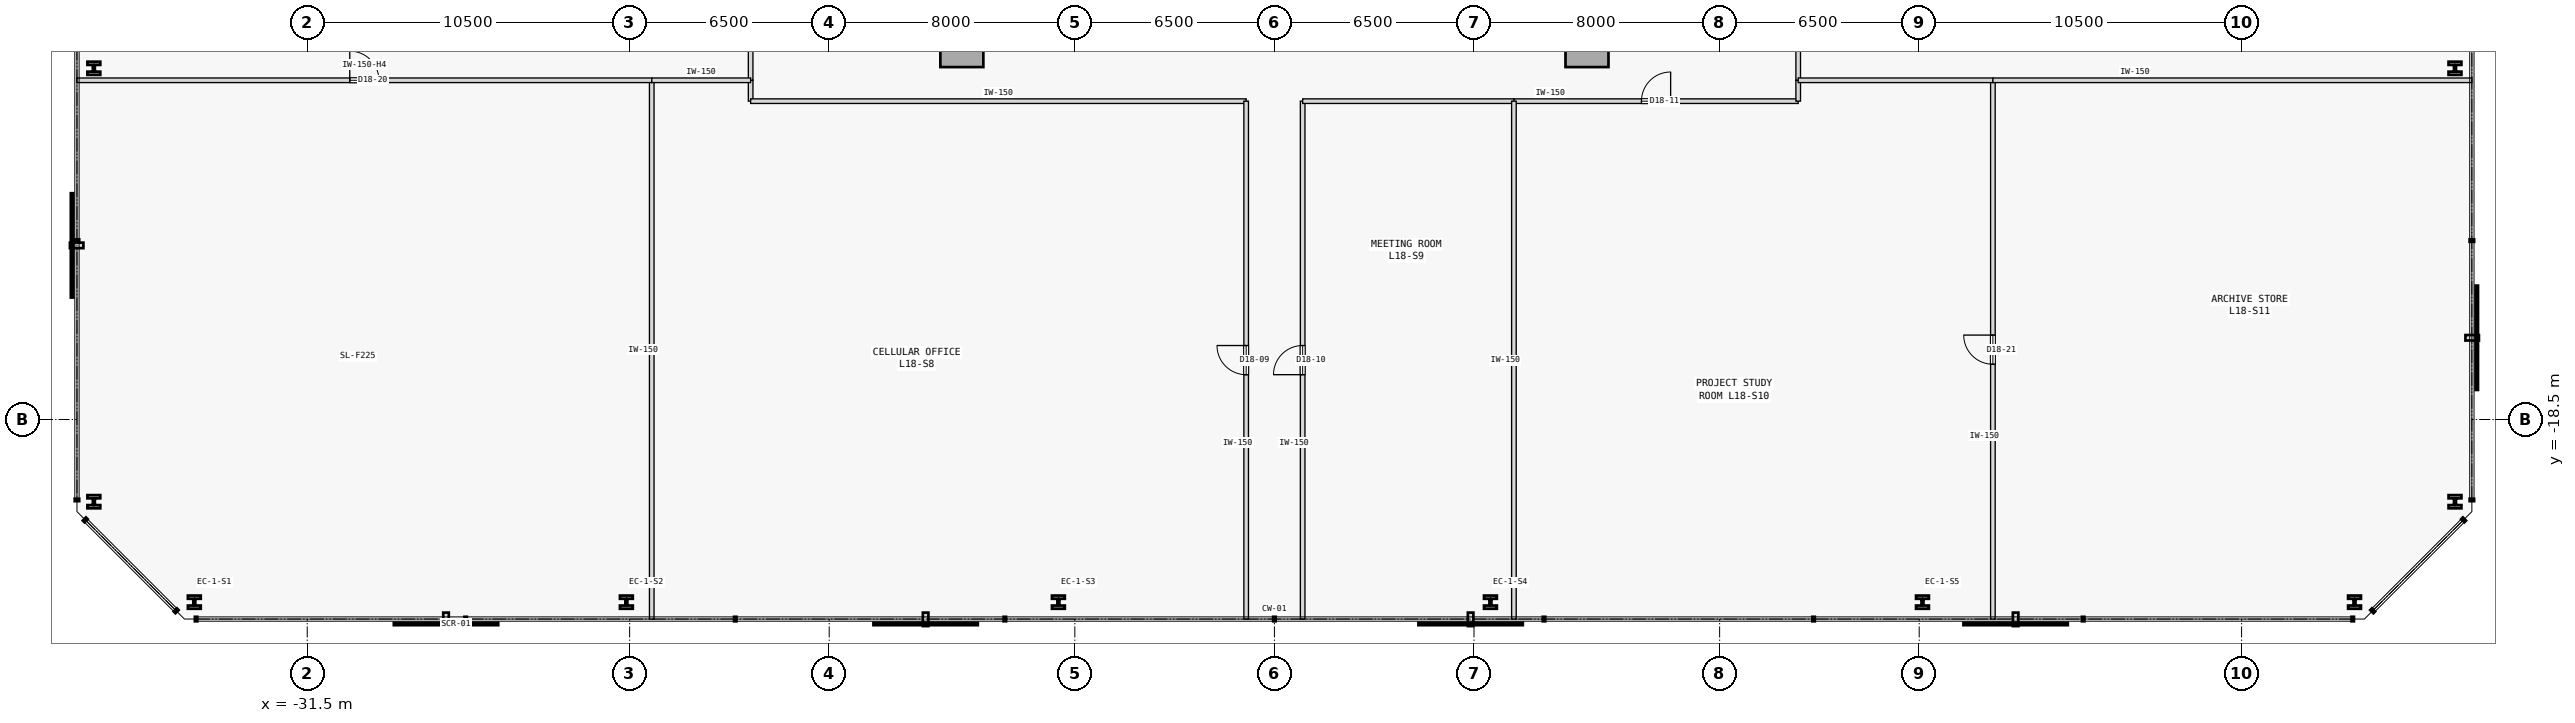
"""IFC4 building model, lengths in metres.
Left out: names, types, materials, properties, quantities, classifications, styles, units other than length and angle.
Written with IfcOpenShell. Run it as: python <this file> out.ifc"""

import sys

from ifc_helpers import new_model, si_unit, direction, frame, frame_2d, origin, origin_2d, place, context, subcontext, project, spatial, rectangle, i_section, extrude, element, fill, save


model = new_model("IFC4")
c1 = context("Model", 3, precision=1e-05, world=origin(), true_north=direction((0.0, 1.0)))
c2 = subcontext(c1, "Body", "Model", "MODEL_VIEW")
j1 = project(units=[si_unit("LENGTHUNIT", "METRE"), si_unit("PLANEANGLEUNIT", "RADIAN")], contexts=[c1])
p1 = place(None, origin())
s1 = spatial("IfcSite", under=j1, at=p1, CompositionType="ELEMENT")
p2 = place(p1, origin())
s2 = spatial("IfcBuilding", under=s1, at=p2, CompositionType="ELEMENT")
p3 = place(p2, frame((0.0, 0.0, 75.0)))
s3 = spatial("IfcBuildingStorey", under=s2, at=p3, CompositionType="ELEMENT", Elevation=75.0)
for number, where, z_axis, x_axis in (
    (1, (-10.18, -6.32, 0.0), (0.0, 0.0, 1.0), (1.0, 0.0, 0.0)),
    (2, (10.18, -6.32, 0.0), (0.0, 0.0, 1.0), (1.0, 0.0, 0.0)),
):
    element("IfcColumn", number, at=place(p3, frame(where, z_axis=z_axis, x_axis=x_axis)), inside=s3, PredefinedType="COLUMN", context=c2, shape_type="SweptSolid", body=[
        extrude(rectangle(XDim=1.4, YDim=1.4, at=origin_2d()), origin(), (0.0, 0.0, 1.0), 3.8),
    ])
for number, where, z_axis, x_axis in (
    (3, (-35.178, -24.45, 0.0), (0.0, 0.0, 1.0), (1.0, 0.0, 0.0)),
    (4, (-21.107, -24.45, 0.0), (0.0, 0.0, 1.0), (1.0, 0.0, 0.0)),
    (5, (-7.036, -24.45, 0.0), (0.0, 0.0, 1.0), (1.0, 0.0, 0.0)),
    (6, (7.036, -24.45, 0.0), (0.0, 0.0, 1.0), (1.0, 0.0, 0.0)),
    (7, (21.107, -24.45, 0.0), (0.0, 0.0, 1.0), (1.0, 0.0, 0.0)),
    (8, (35.178, -24.45, 0.0), (0.0, 0.0, 1.0), (1.0, 0.0, 0.0)),
    (9, (38.45, -21.178, 0.0), (0.0, 0.0, 1.0), (1.0, 0.0, 0.0)),
    (10, (38.45, -7.059, 0.0), (0.0, 0.0, 1.0), (1.0, 0.0, 0.0)),
    (11, (-38.45, -7.059, 0.0), (0.0, 0.0, 1.0), (1.0, 0.0, 0.0)),
    (12, (-38.45, -21.178, 0.0), (0.0, 0.0, 1.0), (1.0, 0.0, 0.0)),
):
    element("IfcColumn", number, at=place(p3, frame(where, z_axis=z_axis, x_axis=x_axis)), inside=s3, PredefinedType="COLUMN", context=c2, shape_type="SweptSolid", body=[
        extrude(i_section(OverallWidth=0.42, OverallDepth=0.431, WebThickness=0.065, FlangeThickness=0.106, FilletRadius=0.015, at=origin_2d()), origin(), (0.0, 0.0, 1.0), 3.8),
    ])
p4 = place(p3, frame((-17.059, -8.13, 0.0), z_axis=(0.0, 0.0, 1.0), x_axis=(0.0, 1.0, 0.0)))
e13 = element("IfcWall", 13, at=p4, inside=s3, PredefinedType="PARTITIONING", context=c2, shape_type="SweptSolid", body=[
    extrude(rectangle(XDim=0.68, YDim=0.15, at=frame_2d((0.34, 0.0))), origin(), (0.0, 0.0, 1.0), 3.4),
])
p5 = place(p3, frame((-17.059, -8.13, 0.0), z_axis=(0.0, 0.0, 1.0), x_axis=(1.0, 0.0, 0.0)))
e14 = element("IfcWall", 14, at=p5, inside=s3, PredefinedType="PARTITIONING", context=c2, shape_type="SweptSolid", body=[
    extrude(rectangle(XDim=16.139, YDim=0.15, at=frame_2d((8.07, 0.0))), origin(), (0.0, 0.0, 1.0), 3.4),
])
p6 = place(p3, frame((-0.92, -25.0, 0.0), z_axis=(0.0, 0.0, 1.0), x_axis=(0.0, 1.0, 0.0)))
e15 = element("IfcWall", 15, at=p6, inside=s3, PredefinedType="PARTITIONING", context=c2, shape_type="SweptSolid", body=[
    extrude(rectangle(XDim=16.87, YDim=0.15, at=frame_2d((8.435, 0.0))), origin(), (0.0, 0.0, 1.0), 3.4),
])
p7 = place(p6, frame((7.96, 0.0, 0.0)))
e16 = element("IfcOpeningElement", 16, at=p7, cuts=e15, PredefinedType="OPENING", context=c2, shape_type="SweptSolid", body=[
    extrude(rectangle(XDim=0.95, YDim=2.15, at=frame_2d((0.475, 1.075))), frame((0.0, 0.085, 0.0), z_axis=(0.0, -1.0, 0.0), x_axis=(1.0, 0.0, 0.0)), (0.0, 0.0, 1.0), 0.17),
])
p8 = place(p3, frame((0.92, -25.0, 0.0), z_axis=(0.0, 0.0, 1.0), x_axis=(0.0, 1.0, 0.0)))
e17 = element("IfcWall", 17, at=p8, inside=s3, PredefinedType="PARTITIONING", context=c2, shape_type="SweptSolid", body=[
    extrude(rectangle(XDim=16.87, YDim=0.15, at=frame_2d((8.435, 0.0))), origin(), (0.0, 0.0, 1.0), 3.4),
])
p9 = place(p8, frame((7.96, 0.0, 0.0)))
e18 = element("IfcOpeningElement", 18, at=p9, cuts=e17, PredefinedType="OPENING", context=c2, shape_type="SweptSolid", body=[
    extrude(rectangle(XDim=0.95, YDim=2.15, at=frame_2d((0.475, 1.075))), frame((0.0, 0.085, 0.0), z_axis=(0.0, -1.0, 0.0), x_axis=(1.0, 0.0, 0.0)), (0.0, 0.0, 1.0), 0.17),
])
p10 = place(p3, frame((0.92, -8.13, 0.0), z_axis=(0.0, 0.0, 1.0), x_axis=(1.0, 0.0, 0.0)))
e19 = element("IfcWall", 19, at=p10, inside=s3, PredefinedType="PARTITIONING", context=c2, shape_type="SweptSolid", body=[
    extrude(rectangle(XDim=6.88, YDim=0.15, at=frame_2d((3.44, 0.0))), origin(), (0.0, 0.0, 1.0), 3.4),
])
p11 = place(p3, frame((7.8, -8.13, 0.0), z_axis=(0.0, 0.0, 1.0), x_axis=(1.0, 0.0, 0.0)))
e20 = element("IfcWall", 20, at=p11, inside=s3, PredefinedType="PARTITIONING", context=c2, shape_type="SweptSolid", body=[
    extrude(rectangle(XDim=9.259, YDim=0.15, at=frame_2d((4.629, 0.0))), origin(), (0.0, 0.0, 1.0), 3.4),
])
p12 = place(p11, frame((4.155, 0.0, 0.0)))
e21 = element("IfcOpeningElement", 21, at=p12, cuts=e20, PredefinedType="OPENING", context=c2, shape_type="SweptSolid", body=[
    extrude(rectangle(XDim=0.95, YDim=2.15, at=frame_2d((0.475, 1.075))), frame((0.0, 0.085, 0.0), z_axis=(0.0, -1.0, 0.0), x_axis=(1.0, 0.0, 0.0)), (0.0, 0.0, 1.0), 0.17),
])
p13 = place(p3, frame((17.059, -8.13, 0.0), z_axis=(0.0, 0.0, 1.0), x_axis=(0.0, 1.0, 0.0)))
e22 = element("IfcWall", 22, at=p13, inside=s3, PredefinedType="PARTITIONING", context=c2, shape_type="SweptSolid", body=[
    extrude(rectangle(XDim=0.68, YDim=0.15, at=frame_2d((0.34, 0.0))), origin(), (0.0, 0.0, 1.0), 3.4),
])
p14 = place(p3, frame((-17.059, -7.45, 0.0), z_axis=(0.0, 0.0, 1.0), x_axis=(0.0, 1.0, 0.0)))
e23 = element("IfcWall", 23, at=p14, inside=s3, PredefinedType="PARTITIONING", context=c2, shape_type="SweptSolid", body=[
    extrude(rectangle(XDim=3.129, YDim=0.15, at=frame_2d((1.564, 0.0))), origin(), (0.0, 0.0, 1.0), 3.4),
])
p15 = place(p14, frame((1.09, 0.0, 0.0)))
e24 = element("IfcOpeningElement", 24, at=p15, cuts=e23, PredefinedType="OPENING", context=c2, shape_type="SweptSolid", body=[
    extrude(rectangle(XDim=0.95, YDim=2.15, at=frame_2d((0.475, 1.075))), frame((0.0, 0.085, 0.0), z_axis=(0.0, -1.0, 0.0), x_axis=(1.0, 0.0, 0.0)), (0.0, 0.0, 1.0), 0.17),
])
p16 = place(p3, frame((17.059, -7.45, 0.0), z_axis=(0.0, 0.0, 1.0), x_axis=(0.0, 1.0, 0.0)))
e25 = element("IfcWall", 25, at=p16, inside=s3, PredefinedType="PARTITIONING", context=c2, shape_type="SweptSolid", body=[
    extrude(rectangle(XDim=6.53, YDim=0.15, at=frame_2d((3.265, 0.0))), origin(), (0.0, 0.0, 1.0), 3.4),
])
p17 = place(p3, frame((-20.28, -25.0, 0.0), z_axis=(0.0, 0.0, 1.0), x_axis=(0.0, 1.0, 0.0)))
e26 = element("IfcWall", 26, at=p17, inside=s3, PredefinedType="PARTITIONING", context=c2, shape_type="SweptSolid", body=[
    extrude(rectangle(XDim=17.55, YDim=0.15, at=frame_2d((8.775, 0.0))), origin(), (0.0, 0.0, 1.0), 3.4),
])
p18 = place(p3, frame((-39.0, -7.45, 0.0), z_axis=(0.0, 0.0, 1.0), x_axis=(1.0, 0.0, 0.0)))
e27 = element("IfcWall", 27, at=p18, inside=s3, PredefinedType="PARTITIONING", context=c2, shape_type="SweptSolid", body=[
    extrude(rectangle(XDim=18.72, YDim=0.15, at=frame_2d((9.36, 0.0))), origin(), (0.0, 0.0, 1.0), 2.34),
])
p19 = place(p18, frame((8.885, 0.0, 0.0)))
e28 = element("IfcOpeningElement", 28, at=p19, cuts=e27, PredefinedType="OPENING", context=c2, shape_type="SweptSolid", body=[
    extrude(rectangle(XDim=0.95, YDim=2.15, at=frame_2d((0.475, 1.075))), frame((0.0, 0.085, 0.0), z_axis=(0.0, -1.0, 0.0), x_axis=(1.0, 0.0, 0.0)), (0.0, 0.0, 1.0), 0.17),
])
p20 = place(p3, frame((-20.28, -7.45, 0.0), z_axis=(0.0, 0.0, 1.0), x_axis=(1.0, 0.0, 0.0)))
e29 = element("IfcWall", 29, at=p20, inside=s3, PredefinedType="PARTITIONING", context=c2, shape_type="SweptSolid", body=[
    extrude(rectangle(XDim=3.221, YDim=0.15, at=frame_2d((1.61, 0.0))), origin(), (0.0, 0.0, 1.0), 3.4),
])
p21 = place(p3, frame((7.8, -25.0, 0.0), z_axis=(0.0, 0.0, 1.0), x_axis=(0.0, 1.0, 0.0)))
e30 = element("IfcWall", 30, at=p21, inside=s3, PredefinedType="PARTITIONING", context=c2, shape_type="SweptSolid", body=[
    extrude(rectangle(XDim=16.87, YDim=0.15, at=frame_2d((8.435, 0.0))), origin(), (0.0, 0.0, 1.0), 3.4),
])
p22 = place(p3, frame((23.4, -25.0, 0.0), z_axis=(0.0, 0.0, 1.0), x_axis=(0.0, 1.0, 0.0)))
e31 = element("IfcWall", 31, at=p22, inside=s3, PredefinedType="PARTITIONING", context=c2, shape_type="SweptSolid", body=[
    extrude(rectangle(XDim=17.55, YDim=0.15, at=frame_2d((8.775, 0.0))), origin(), (0.0, 0.0, 1.0), 3.4),
])
p23 = place(p22, frame((8.3, 0.0, 0.0)))
e32 = element("IfcOpeningElement", 32, at=p23, cuts=e31, PredefinedType="OPENING", context=c2, shape_type="SweptSolid", body=[
    extrude(rectangle(XDim=0.95, YDim=2.15, at=frame_2d((0.475, 1.075))), frame((0.0, 0.085, 0.0), z_axis=(0.0, -1.0, 0.0), x_axis=(1.0, 0.0, 0.0)), (0.0, 0.0, 1.0), 0.17),
])
p24 = place(p3, frame((17.059, -7.45, 0.0), z_axis=(0.0, 0.0, 1.0), x_axis=(1.0, 0.0, 0.0)))
e33 = element("IfcWall", 33, at=p24, inside=s3, PredefinedType="PARTITIONING", context=c2, shape_type="SweptSolid", body=[
    extrude(rectangle(XDim=6.341, YDim=0.15, at=frame_2d((3.17, 0.0))), origin(), (0.0, 0.0, 1.0), 3.4),
])
p25 = place(p3, frame((23.4, -7.45, 0.0), z_axis=(0.0, 0.0, 1.0), x_axis=(1.0, 0.0, 0.0)))
e34 = element("IfcWall", 34, at=p25, inside=s3, PredefinedType="PARTITIONING", context=c2, shape_type="SweptSolid", body=[
    extrude(rectangle(XDim=15.6, YDim=0.15, at=frame_2d((7.8, 0.0))), origin(), (0.0, 0.0, 1.0), 3.4),
])
p26 = place(p7, origin())
e35 = element("IfcDoor", 35, at=p26, inside=s3, OperationType="SINGLE_SWING_RIGHT", PredefinedType="DOOR", context=c2, shape_type="SweptSolid", body=[
    extrude(rectangle(XDim=0.95, YDim=2.15, at=frame_2d((0.475, 1.075))), frame((0.0, 0.025, 0.0), z_axis=(0.0, -1.0, 0.0), x_axis=(1.0, 0.0, 0.0)), (0.0, 0.0, 1.0), 0.05),
])
fill(e16, e35)
p27 = place(p9, origin())
e36 = element("IfcDoor", 36, at=p27, inside=s3, OperationType="SINGLE_SWING_LEFT", PredefinedType="DOOR", context=c2, shape_type="SweptSolid", body=[
    extrude(rectangle(XDim=0.95, YDim=2.15, at=frame_2d((0.475, 1.075))), frame((0.0, 0.025, 0.0), z_axis=(0.0, -1.0, 0.0), x_axis=(1.0, 0.0, 0.0)), (0.0, 0.0, 1.0), 0.05),
])
fill(e18, e36)
p28 = place(p12, origin())
e37 = element("IfcDoor", 37, at=p28, inside=s3, OperationType="SINGLE_SWING_RIGHT", PredefinedType="DOOR", context=c2, shape_type="SweptSolid", body=[
    extrude(rectangle(XDim=0.95, YDim=2.15, at=frame_2d((0.475, 1.075))), frame((0.0, 0.025, 0.0), z_axis=(0.0, -1.0, 0.0), x_axis=(1.0, 0.0, 0.0)), (0.0, 0.0, 1.0), 0.05),
])
fill(e21, e37)
p29 = place(p19, origin())
e38 = element("IfcDoor", 38, at=p29, inside=s3, OperationType="SINGLE_SWING_LEFT", PredefinedType="DOOR", context=c2, shape_type="SweptSolid", body=[
    extrude(rectangle(XDim=0.95, YDim=2.15, at=frame_2d((0.475, 1.075))), frame((0.0, 0.025, 0.0), z_axis=(0.0, -1.0, 0.0), x_axis=(1.0, 0.0, 0.0)), (0.0, 0.0, 1.0), 0.05),
])
fill(e28, e38)
p30 = place(p23, origin())
e39 = element("IfcDoor", 39, at=p30, inside=s3, OperationType="SINGLE_SWING_RIGHT", PredefinedType="DOOR", context=c2, shape_type="SweptSolid", body=[
    extrude(rectangle(XDim=0.95, YDim=2.15, at=frame_2d((0.475, 1.075))), frame((0.0, 0.025, 0.0), z_axis=(0.0, -1.0, 0.0), x_axis=(1.0, 0.0, 0.0)), (0.0, 0.0, 1.0), 0.05),
])
fill(e32, e39)
save(model, sys.argv[1])
